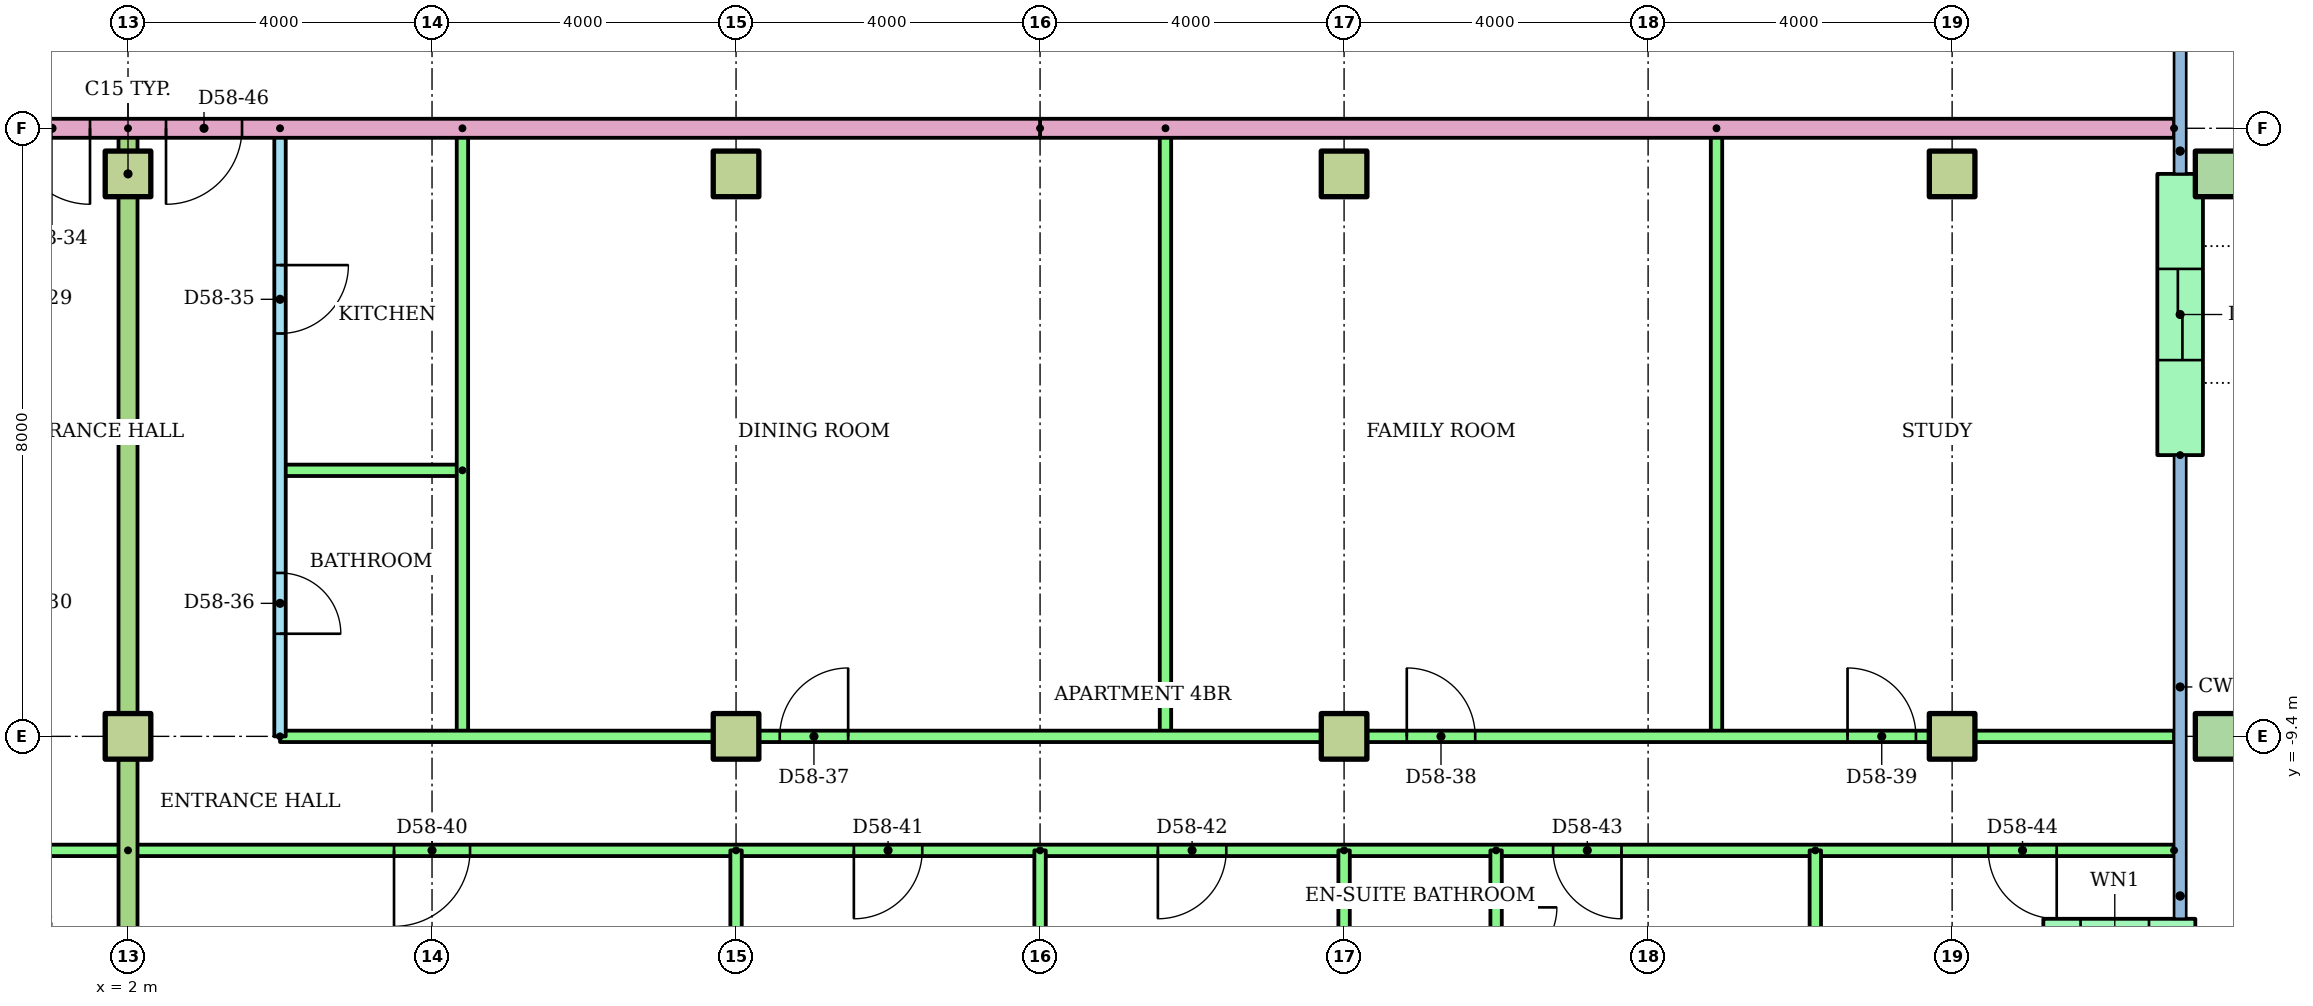
"""IFC4 building model, lengths in metres.
Left out: names, types, materials, properties, quantities, classifications, styles, units other than length and angle.
Written with IfcOpenShell. Run it as: python <this file> out.ifc"""

import sys

from ifc_helpers import new_model, si_unit, direction, frame, frame_2d, origin, origin_2d, place, context, subcontext, project, spatial, rectangle, hollow_rectangle, extrude, element, fill, save


model = new_model("IFC4")
c1 = context("Model", 3, precision=1e-05, world=origin(), true_north=direction((0.0, 1.0)))
c2 = subcontext(c1, "Body", "Model", "MODEL_VIEW")
j1 = project(units=[si_unit("LENGTHUNIT", "METRE"), si_unit("PLANEANGLEUNIT", "RADIAN")], contexts=[c1])
p1 = place(None, origin())
s1 = spatial("IfcSite", under=j1, at=p1, CompositionType="ELEMENT")
p2 = place(p1, origin())
s2 = spatial("IfcBuilding", under=s1, at=p2, CompositionType="ELEMENT")
p3 = place(p2, frame((0.0, 0.0, 223.6)))
s3 = spatial("IfcBuildingStorey", under=s2, at=p3, CompositionType="ELEMENT", Elevation=223.6)
for number, where in (
    (1, (2.0, -9.4, 0.0)),
    (2, (10.0, -9.4, 0.0)),
    (3, (18.0, -9.4, 0.0)),
    (4, (26.0, -9.4, 0.0)),
):
    element("IfcColumn", number, at=place(p3, frame(where)), inside=s3, PredefinedType="COLUMN", context=c2, shape_type="SweptSolid", body=[
        extrude(rectangle(XDim=0.6, YDim=0.6, at=origin_2d()), origin(), (0.0, 0.0, 1.0), 3.2),
    ])
p4 = place(p3, frame((29.5, -9.4, 0.0)))
e5 = element("IfcColumn", 5, at=p4, inside=s3, PredefinedType="COLUMN", context=c2, shape_type="SweptSolid", body=[
    extrude(hollow_rectangle(XDim=0.6, YDim=0.6, WallThickness=0.03, at=origin_2d()), origin(), (0.0, 0.0, 1.0), 3.2),
])
for number, where in (
    (6, (2.0, -2.0, 0.0)),
    (7, (10.0, -2.0, 0.0)),
    (8, (18.0, -2.0, 0.0)),
    (9, (26.0, -2.0, 0.0)),
):
    element("IfcColumn", number, at=place(p3, frame(where)), inside=s3, PredefinedType="COLUMN", context=c2, shape_type="SweptSolid", body=[
        extrude(rectangle(XDim=0.6, YDim=0.6, at=origin_2d()), origin(), (0.0, 0.0, 1.0), 3.2),
    ])
p5 = place(p3, frame((29.5, -2.0, 0.0)))
e10 = element("IfcColumn", 10, at=p5, inside=s3, PredefinedType="COLUMN", context=c2, shape_type="SweptSolid", body=[
    extrude(hollow_rectangle(XDim=0.6, YDim=0.6, WallThickness=0.03, at=origin_2d()), origin(), (0.0, 0.0, 1.0), 3.2),
])
p6 = place(p3, frame((27.2, -12.1, 0.0)))
e11 = element("IfcWall", 11, at=p6, inside=s3, PredefinedType="STANDARD", context=c2, shape_type="SweptSolid", body=[
    extrude(rectangle(XDim=2.0, YDim=0.6, at=frame_2d((1.0, 0.0))), origin(), (0.0, 0.0, 1.0), 2.92),
])
p7 = place(p6, frame((0.49, 0.0, 0.9)))
e12 = element("IfcOpeningElement", 12, at=p7, cuts=e11, PredefinedType="OPENING", context=c2, shape_type="SweptSolid", body=[
    extrude(rectangle(XDim=0.9, YDim=1.5, at=frame_2d((0.45, 0.75))), frame((0.0, 0.31, 0.0), z_axis=(0.0, -1.0, 0.0), x_axis=(1.0, 0.0, 0.0)), (0.0, 0.0, 1.0), 0.62),
])
p8 = place(p3, frame((29.0, -5.7, 0.0), z_axis=(0.0, 0.0, 1.0), x_axis=(0.0, 1.0, 0.0)))
e13 = element("IfcWall", 13, at=p8, inside=s3, PredefinedType="STANDARD", context=c2, shape_type="SweptSolid", body=[
    extrude(rectangle(XDim=3.7, YDim=0.6, at=frame_2d((1.85, 0.0))), origin(), (0.0, 0.0, 1.0), 2.92),
])
p9 = place(p8, frame((1.25, 0.0, 0.0)))
e14 = element("IfcOpeningElement", 14, at=p9, cuts=e13, PredefinedType="OPENING", context=c2, shape_type="SweptSolid", body=[
    extrude(rectangle(XDim=1.2, YDim=2.1, at=frame_2d((0.6, 1.05))), frame((0.0, 0.31, 0.0), z_axis=(0.0, -1.0, 0.0), x_axis=(1.0, 0.0, 0.0)), (0.0, 0.0, 1.0), 0.62),
])
p10 = place(p3, frame((2.0, -10.9, 0.0), z_axis=(0.0, 0.0, 1.0), x_axis=(-1.0, 0.0, 0.0)))
e15 = element("IfcWall", 15, at=p10, inside=s3, PredefinedType="PARTITIONING", context=c2, shape_type="SweptSolid", body=[
    extrude(rectangle(XDim=8.0, YDim=0.15, at=frame_2d((4.0, 0.0))), origin(), (0.0, 0.0, 1.0), 2.4),
])
p11 = place(p10, frame((5.55, 0.0, 0.0)))
e16 = element("IfcOpeningElement", 16, at=p11, cuts=e15, PredefinedType="OPENING", context=c2, shape_type="SweptSolid", body=[
    extrude(rectangle(XDim=0.9, YDim=2.1, at=frame_2d((0.45, 1.05))), frame((0.0, 0.085, 0.0), z_axis=(0.0, -1.0, 0.0), x_axis=(1.0, 0.0, 0.0)), (0.0, 0.0, 1.0), 0.17),
])
p12 = place(p10, frame((1.5, 0.0, 0.0)))
e17 = element("IfcOpeningElement", 17, at=p12, cuts=e15, PredefinedType="OPENING", context=c2, shape_type="SweptSolid", body=[
    extrude(rectangle(XDim=1.0, YDim=2.1, at=frame_2d((0.5, 1.05))), frame((0.0, 0.085, 0.0), z_axis=(0.0, -1.0, 0.0), x_axis=(1.0, 0.0, 0.0)), (0.0, 0.0, 1.0), 0.17),
])
p13 = place(p3, frame((4.0, -1.4, 0.0), z_axis=(0.0, 0.0, 1.0), x_axis=(0.0, -1.0, 0.0)))
e18 = element("IfcWall", 18, at=p13, inside=s3, PredefinedType="PARTITIONING", context=c2, shape_type="SweptSolid", body=[
    extrude(rectangle(XDim=8.0, YDim=0.15, at=frame_2d((4.0, 0.0))), origin(), (0.0, 0.0, 1.0), 2.4),
])
p14 = place(p13, frame((1.8, 0.0, 0.0)))
e19 = element("IfcOpeningElement", 19, at=p14, cuts=e18, PredefinedType="OPENING", context=c2, shape_type="SweptSolid", body=[
    extrude(rectangle(XDim=0.9, YDim=2.1, at=frame_2d((0.45, 1.05))), frame((0.0, 0.085, 0.0), z_axis=(0.0, -1.0, 0.0), x_axis=(1.0, 0.0, 0.0)), (0.0, 0.0, 1.0), 0.17),
])
p15 = place(p13, frame((5.85, 0.0, 0.0)))
e20 = element("IfcOpeningElement", 20, at=p15, cuts=e18, PredefinedType="OPENING", context=c2, shape_type="SweptSolid", body=[
    extrude(rectangle(XDim=0.8, YDim=2.1, at=frame_2d((0.4, 1.05))), frame((0.0, 0.085, 0.0), z_axis=(0.0, -1.0, 0.0), x_axis=(1.0, 0.0, 0.0)), (0.0, 0.0, 1.0), 0.17),
])
p16 = place(p3, frame((6.4, -5.9, 0.0), z_axis=(0.0, 0.0, 1.0), x_axis=(-1.0, 0.0, 0.0)))
e21 = element("IfcWall", 21, at=p16, inside=s3, PredefinedType="PARTITIONING", context=c2, shape_type="SweptSolid", body=[
    extrude(rectangle(XDim=2.4, YDim=0.15, at=frame_2d((1.2, 0.0))), origin(), (0.0, 0.0, 1.0), 2.4),
])
for number, where, z_axis, x_axis in (
    (22, (6.4, -1.4, 0.0), (0.0, 0.0, 1.0), (0.0, -1.0, 0.0)),
    (23, (15.65, -1.4, 0.0), (0.0, 0.0, 1.0), (0.0, -1.0, 0.0)),
    (24, (22.9, -1.4, 0.0), (0.0, 0.0, 1.0), (0.0, -1.0, 0.0)),
):
    element("IfcWall", number, at=place(p3, frame(where, z_axis=z_axis, x_axis=x_axis)), inside=s3, PredefinedType="PARTITIONING", context=c2, shape_type="SweptSolid", body=[
        extrude(rectangle(XDim=8.0, YDim=0.15, at=frame_2d((4.0, 0.0))), origin(), (0.0, 0.0, 1.0), 2.4),
    ])
p17 = place(p3, frame((4.0, -9.4, 0.0)))
e25 = element("IfcWall", 25, at=p17, inside=s3, PredefinedType="PARTITIONING", context=c2, shape_type="SweptSolid", body=[
    extrude(rectangle(XDim=24.92, YDim=0.15, at=frame_2d((12.46, 0.0))), origin(), (0.0, 0.0, 1.0), 2.4),
])
p18 = place(p17, frame((6.575, 0.0, 0.0)))
e26 = element("IfcOpeningElement", 26, at=p18, cuts=e25, PredefinedType="OPENING", context=c2, shape_type="SweptSolid", body=[
    extrude(rectangle(XDim=0.9, YDim=2.1, at=frame_2d((0.45, 1.05))), frame((0.0, 0.085, 0.0), z_axis=(0.0, -1.0, 0.0), x_axis=(1.0, 0.0, 0.0)), (0.0, 0.0, 1.0), 0.17),
])
p19 = place(p17, frame((14.825, 0.0, 0.0)))
e27 = element("IfcOpeningElement", 27, at=p19, cuts=e25, PredefinedType="OPENING", context=c2, shape_type="SweptSolid", body=[
    extrude(rectangle(XDim=0.9, YDim=2.1, at=frame_2d((0.45, 1.05))), frame((0.0, 0.085, 0.0), z_axis=(0.0, -1.0, 0.0), x_axis=(1.0, 0.0, 0.0)), (0.0, 0.0, 1.0), 0.17),
])
p20 = place(p17, frame((20.624, 0.0, 0.0)))
e28 = element("IfcOpeningElement", 28, at=p20, cuts=e25, PredefinedType="OPENING", context=c2, shape_type="SweptSolid", body=[
    extrude(rectangle(XDim=0.9, YDim=2.1, at=frame_2d((0.45, 1.05))), frame((0.0, 0.085, 0.0), z_axis=(0.0, -1.0, 0.0), x_axis=(1.0, 0.0, 0.0)), (0.0, 0.0, 1.0), 0.17),
])
p21 = place(p3, frame((28.92, -10.9, 0.0), z_axis=(0.0, 0.0, 1.0), x_axis=(-1.0, 0.0, 0.0)))
e29 = element("IfcWall", 29, at=p21, inside=s3, PredefinedType="PARTITIONING", context=c2, shape_type="SweptSolid", body=[
    extrude(rectangle(XDim=26.92, YDim=0.15, at=frame_2d((13.46, 0.0))), origin(), (0.0, 0.0, 1.0), 2.4),
])
p22 = place(p21, frame((22.42, 0.0, 0.0)))
e30 = element("IfcOpeningElement", 30, at=p22, cuts=e29, PredefinedType="OPENING", context=c2, shape_type="SweptSolid", body=[
    extrude(rectangle(XDim=1.0, YDim=2.1, at=frame_2d((0.5, 1.05))), frame((0.0, 0.085, 0.0), z_axis=(0.0, -1.0, 0.0), x_axis=(1.0, 0.0, 0.0)), (0.0, 0.0, 1.0), 0.17),
])
p23 = place(p21, frame((16.47, 0.0, 0.0)))
e31 = element("IfcOpeningElement", 31, at=p23, cuts=e29, PredefinedType="OPENING", context=c2, shape_type="SweptSolid", body=[
    extrude(rectangle(XDim=0.9, YDim=2.1, at=frame_2d((0.45, 1.05))), frame((0.0, 0.085, 0.0), z_axis=(0.0, -1.0, 0.0), x_axis=(1.0, 0.0, 0.0)), (0.0, 0.0, 1.0), 0.17),
])
p24 = place(p21, frame((12.47, 0.0, 0.0)))
e32 = element("IfcOpeningElement", 32, at=p24, cuts=e29, PredefinedType="OPENING", context=c2, shape_type="SweptSolid", body=[
    extrude(rectangle(XDim=0.9, YDim=2.1, at=frame_2d((0.45, 1.05))), frame((0.0, 0.085, 0.0), z_axis=(0.0, -1.0, 0.0), x_axis=(1.0, 0.0, 0.0)), (0.0, 0.0, 1.0), 0.17),
])
p25 = place(p21, frame((7.27, 0.0, 0.0)))
e33 = element("IfcOpeningElement", 33, at=p25, cuts=e29, PredefinedType="OPENING", context=c2, shape_type="SweptSolid", body=[
    extrude(rectangle(XDim=0.9, YDim=2.1, at=frame_2d((0.45, 1.05))), frame((0.0, 0.085, 0.0), z_axis=(0.0, -1.0, 0.0), x_axis=(1.0, 0.0, 0.0)), (0.0, 0.0, 1.0), 0.17),
])
p26 = place(p21, frame((1.544, 0.0, 0.0)))
e34 = element("IfcOpeningElement", 34, at=p26, cuts=e29, PredefinedType="OPENING", context=c2, shape_type="SweptSolid", body=[
    extrude(rectangle(XDim=0.9, YDim=2.1, at=frame_2d((0.45, 1.05))), frame((0.0, 0.085, 0.0), z_axis=(0.0, -1.0, 0.0), x_axis=(1.0, 0.0, 0.0)), (0.0, 0.0, 1.0), 0.17),
])
p27 = place(p3, frame((10.0, -10.9, 0.0), z_axis=(0.0, 0.0, 1.0), x_axis=(0.0, -1.0, 0.0)))
e35 = element("IfcWall", 35, at=p27, inside=s3, PredefinedType="PARTITIONING", context=c2, shape_type="SweptSolid", body=[
    extrude(rectangle(XDim=5.61, YDim=0.15, at=frame_2d((2.805, 0.0))), origin(), (0.0, 0.0, 1.0), 2.4),
])
p28 = place(p3, frame((14.0, -10.9, 0.0), z_axis=(0.0, 0.0, 1.0), x_axis=(0.0, -1.0, 0.0)))
e36 = element("IfcWall", 36, at=p28, inside=s3, PredefinedType="PARTITIONING", context=c2, shape_type="SweptSolid", body=[
    extrude(rectangle(XDim=5.621, YDim=0.15, at=frame_2d((2.811, 0.0))), origin(), (0.0, 0.0, 1.0), 2.4),
])
p29 = place(p3, frame((18.0, -10.9, 0.0), z_axis=(0.0, 0.0, 1.0), x_axis=(0.0, -1.0, 0.0)))
e37 = element("IfcWall", 37, at=p29, inside=s3, PredefinedType="PARTITIONING", context=c2, shape_type="SweptSolid", body=[
    extrude(rectangle(XDim=5.61, YDim=0.15, at=frame_2d((2.805, 0.0))), origin(), (0.0, 0.0, 1.0), 2.4),
])
p30 = place(p3, frame((24.2, -10.9, 0.0), z_axis=(0.0, 0.0, 1.0), x_axis=(0.0, -1.0, 0.0)))
e38 = element("IfcWall", 38, at=p30, inside=s3, PredefinedType="PARTITIONING", context=c2, shape_type="SweptSolid", body=[
    extrude(rectangle(XDim=3.82, YDim=0.15, at=frame_2d((1.91, 0.0))), origin(), (0.0, 0.0, 1.0), 2.4),
])
p31 = place(p3, frame((20.0, -10.9, 0.0), z_axis=(0.0, 0.0, 1.0), x_axis=(0.0, -1.0, 0.0)))
e39 = element("IfcWall", 39, at=p31, inside=s3, PredefinedType="PARTITIONING", context=c2, shape_type="SweptSolid", body=[
    extrude(rectangle(XDim=2.3, YDim=0.15, at=frame_2d((1.15, 0.0))), origin(), (0.0, 0.0, 1.0), 2.4),
])
p32 = place(p31, frame((0.75, 0.0, 0.0)))
e40 = element("IfcOpeningElement", 40, at=p32, cuts=e39, PredefinedType="OPENING", context=c2, shape_type="SweptSolid", body=[
    extrude(rectangle(XDim=0.8, YDim=2.1, at=frame_2d((0.4, 1.05))), frame((0.0, 0.085, 0.0), z_axis=(0.0, -1.0, 0.0), x_axis=(1.0, 0.0, 0.0)), (0.0, 0.0, 1.0), 0.17),
])
p33 = place(p3, frame((2.0, -1.4, 0.0), z_axis=(0.0, 0.0, 1.0), x_axis=(0.0, -1.0, 0.0)))
e41 = element("IfcWall", 41, at=p33, inside=s3, PredefinedType="PARTITIONING", context=c2, shape_type="SweptSolid", body=[
    extrude(rectangle(XDim=15.11, YDim=0.25, at=frame_2d((7.555, 0.0))), origin(), (0.0, 0.0, 1.0), 2.4),
])
p34 = place(p3, frame((28.92, -1.4, 0.0), z_axis=(0.0, 0.0, 1.0), x_axis=(-1.0, 0.0, 0.0)))
e42 = element("IfcWall", 42, at=p34, inside=s3, PredefinedType="PARTITIONING", context=c2, shape_type="SweptSolid", body=[
    extrude(rectangle(XDim=14.92, YDim=0.25, at=frame_2d((7.46, 0.0))), origin(), (0.0, 0.0, 1.0), 2.4),
])
p35 = place(p3, frame((14.0, -1.4, 0.0), z_axis=(0.0, 0.0, 1.0), x_axis=(-1.0, 0.0, 0.0)))
e43 = element("IfcWall", 43, at=p35, inside=s3, PredefinedType="PARTITIONING", context=c2, shape_type="SweptSolid", body=[
    extrude(rectangle(XDim=28.0, YDim=0.25, at=frame_2d((14.0, 0.0))), origin(), (0.0, 0.0, 1.0), 2.4),
])
p36 = place(p35, frame((20.5, 0.0, 0.0)))
e44 = element("IfcOpeningElement", 44, at=p36, cuts=e43, PredefinedType="OPENING", context=c2, shape_type="SweptSolid", body=[
    extrude(rectangle(XDim=1.0, YDim=2.1, at=frame_2d((0.5, 1.05))), frame((0.0, 0.135, 0.0), z_axis=(0.0, -1.0, 0.0), x_axis=(1.0, 0.0, 0.0)), (0.0, 0.0, 1.0), 0.27),
])
p37 = place(p35, frame((12.5, 0.0, 0.0)))
e45 = element("IfcOpeningElement", 45, at=p37, cuts=e43, PredefinedType="OPENING", context=c2, shape_type="SweptSolid", body=[
    extrude(rectangle(XDim=1.0, YDim=2.1, at=frame_2d((0.5, 1.05))), frame((0.0, 0.135, 0.0), z_axis=(0.0, -1.0, 0.0), x_axis=(1.0, 0.0, 0.0)), (0.0, 0.0, 1.0), 0.27),
])
p38 = place(p35, frame((10.5, 0.0, 0.0)))
e46 = element("IfcOpeningElement", 46, at=p38, cuts=e43, PredefinedType="OPENING", context=c2, shape_type="SweptSolid", body=[
    extrude(rectangle(XDim=1.0, YDim=2.1, at=frame_2d((0.5, 1.05))), frame((0.0, 0.135, 0.0), z_axis=(0.0, -1.0, 0.0), x_axis=(1.0, 0.0, 0.0)), (0.0, 0.0, 1.0), 0.27),
])
p39 = place(p37, origin())
e47 = element("IfcDoor", 47, at=p39, inside=s3, OperationType="SINGLE_SWING_LEFT", PredefinedType="DOOR", context=c2, shape_type="SweptSolid", body=[
    extrude(rectangle(XDim=1.0, YDim=2.1, at=frame_2d((0.5, 1.05))), frame((0.0, 0.025, 0.0), z_axis=(0.0, -1.0, 0.0), x_axis=(1.0, 0.0, 0.0)), (0.0, 0.0, 1.0), 0.05),
])
fill(e45, e47)
p40 = place(p14, origin())
e48 = element("IfcDoor", 48, at=p40, inside=s3, OperationType="SINGLE_SWING_LEFT", PredefinedType="DOOR", context=c2, shape_type="SweptSolid", body=[
    extrude(rectangle(XDim=0.9, YDim=2.1, at=frame_2d((0.45, 1.05))), frame((0.0, 0.025, 0.0), z_axis=(0.0, -1.0, 0.0), x_axis=(1.0, 0.0, 0.0)), (0.0, 0.0, 1.0), 0.05),
])
fill(e19, e48)
p41 = place(p15, origin())
e49 = element("IfcDoor", 49, at=p41, inside=s3, OperationType="SINGLE_SWING_RIGHT", PredefinedType="DOOR", context=c2, shape_type="SweptSolid", body=[
    extrude(rectangle(XDim=0.8, YDim=2.1, at=frame_2d((0.4, 1.05))), frame((0.0, 0.025, 0.0), z_axis=(0.0, -1.0, 0.0), x_axis=(1.0, 0.0, 0.0)), (0.0, 0.0, 1.0), 0.05),
])
fill(e20, e49)
p42 = place(p18, origin())
e50 = element("IfcDoor", 50, at=p42, inside=s3, OperationType="SINGLE_SWING_RIGHT", PredefinedType="DOOR", context=c2, shape_type="SweptSolid", body=[
    extrude(rectangle(XDim=0.9, YDim=2.1, at=frame_2d((0.45, 1.05))), frame((0.0, 0.025, 0.0), z_axis=(0.0, -1.0, 0.0), x_axis=(1.0, 0.0, 0.0)), (0.0, 0.0, 1.0), 0.05),
])
fill(e26, e50)
p43 = place(p19, origin())
e51 = element("IfcDoor", 51, at=p43, inside=s3, OperationType="SINGLE_SWING_LEFT", PredefinedType="DOOR", context=c2, shape_type="SweptSolid", body=[
    extrude(rectangle(XDim=0.9, YDim=2.1, at=frame_2d((0.45, 1.05))), frame((0.0, 0.025, 0.0), z_axis=(0.0, -1.0, 0.0), x_axis=(1.0, 0.0, 0.0)), (0.0, 0.0, 1.0), 0.05),
])
fill(e27, e51)
p44 = place(p20, origin())
e52 = element("IfcDoor", 52, at=p44, inside=s3, OperationType="SINGLE_SWING_LEFT", PredefinedType="DOOR", context=c2, shape_type="SweptSolid", body=[
    extrude(rectangle(XDim=0.9, YDim=2.1, at=frame_2d((0.45, 1.05))), frame((0.0, 0.025, 0.0), z_axis=(0.0, -1.0, 0.0), x_axis=(1.0, 0.0, 0.0)), (0.0, 0.0, 1.0), 0.05),
])
fill(e28, e52)
p45 = place(p22, origin())
e53 = element("IfcDoor", 53, at=p45, inside=s3, OperationType="SINGLE_SWING_RIGHT", PredefinedType="DOOR", context=c2, shape_type="SweptSolid", body=[
    extrude(rectangle(XDim=1.0, YDim=2.1, at=frame_2d((0.5, 1.05))), frame((0.0, 0.025, 0.0), z_axis=(0.0, -1.0, 0.0), x_axis=(1.0, 0.0, 0.0)), (0.0, 0.0, 1.0), 0.05),
])
fill(e30, e53)
p46 = place(p23, origin())
e54 = element("IfcDoor", 54, at=p46, inside=s3, OperationType="SINGLE_SWING_RIGHT", PredefinedType="DOOR", context=c2, shape_type="SweptSolid", body=[
    extrude(rectangle(XDim=0.9, YDim=2.1, at=frame_2d((0.45, 1.05))), frame((0.0, 0.025, 0.0), z_axis=(0.0, -1.0, 0.0), x_axis=(1.0, 0.0, 0.0)), (0.0, 0.0, 1.0), 0.05),
])
fill(e31, e54)
p47 = place(p24, origin())
e55 = element("IfcDoor", 55, at=p47, inside=s3, OperationType="SINGLE_SWING_RIGHT", PredefinedType="DOOR", context=c2, shape_type="SweptSolid", body=[
    extrude(rectangle(XDim=0.9, YDim=2.1, at=frame_2d((0.45, 1.05))), frame((0.0, 0.025, 0.0), z_axis=(0.0, -1.0, 0.0), x_axis=(1.0, 0.0, 0.0)), (0.0, 0.0, 1.0), 0.05),
])
fill(e32, e55)
p48 = place(p25, origin())
e56 = element("IfcDoor", 56, at=p48, inside=s3, OperationType="SINGLE_SWING_LEFT", PredefinedType="DOOR", context=c2, shape_type="SweptSolid", body=[
    extrude(rectangle(XDim=0.9, YDim=2.1, at=frame_2d((0.45, 1.05))), frame((0.0, 0.025, 0.0), z_axis=(0.0, -1.0, 0.0), x_axis=(1.0, 0.0, 0.0)), (0.0, 0.0, 1.0), 0.05),
])
fill(e33, e56)
p49 = place(p26, origin())
e57 = element("IfcDoor", 57, at=p49, inside=s3, OperationType="SINGLE_SWING_LEFT", PredefinedType="DOOR", context=c2, shape_type="SweptSolid", body=[
    extrude(rectangle(XDim=0.9, YDim=2.1, at=frame_2d((0.45, 1.05))), frame((0.0, 0.025, 0.0), z_axis=(0.0, -1.0, 0.0), x_axis=(1.0, 0.0, 0.0)), (0.0, 0.0, 1.0), 0.05),
])
fill(e34, e57)
p50 = place(p32, origin())
e58 = element("IfcDoor", 58, at=p50, inside=s3, OperationType="SINGLE_SWING_LEFT", PredefinedType="DOOR", context=c2, shape_type="SweptSolid", body=[
    extrude(rectangle(XDim=0.8, YDim=2.1, at=frame_2d((0.4, 1.05))), frame((0.0, 0.025, 0.0), z_axis=(0.0, -1.0, 0.0), x_axis=(1.0, 0.0, 0.0)), (0.0, 0.0, 1.0), 0.05),
])
fill(e40, e58)
p51 = place(p38, origin())
e59 = element("IfcDoor", 59, at=p51, inside=s3, OperationType="SINGLE_SWING_RIGHT", PredefinedType="DOOR", context=c2, shape_type="SweptSolid", body=[
    extrude(rectangle(XDim=1.0, YDim=2.1, at=frame_2d((0.5, 1.05))), frame((0.0, 0.025, 0.0), z_axis=(0.0, -1.0, 0.0), x_axis=(1.0, 0.0, 0.0)), (0.0, 0.0, 1.0), 0.05),
])
fill(e46, e59)
p52 = place(p9, origin())
e60 = element("IfcDoor", 60, at=p52, inside=s3, OperationType="SLIDING_TO_LEFT", PredefinedType="DOOR", context=c2, shape_type="SweptSolid", body=[
    extrude(rectangle(XDim=1.2, YDim=2.1, at=frame_2d((0.6, 1.05))), frame((0.0, 0.025, 0.0), z_axis=(0.0, -1.0, 0.0), x_axis=(1.0, 0.0, 0.0)), (0.0, 0.0, 1.0), 0.05),
])
fill(e14, e60)
save(model, sys.argv[1])
